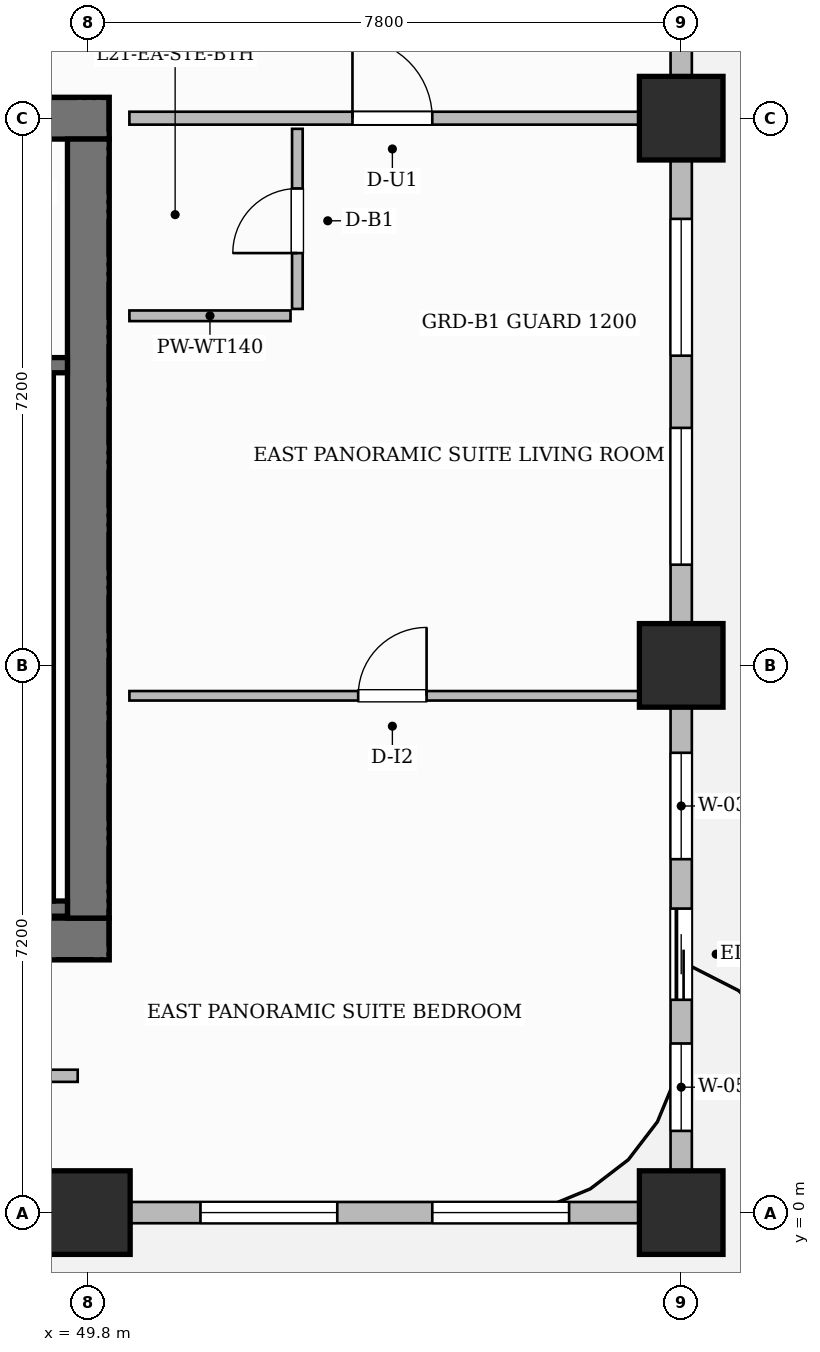
"""IFC4 building model, lengths in metres.
Left out: names, types, materials, properties, quantities, classifications, styles, units other than length and angle.
Written with IfcOpenShell. Run it as: python <this file> out.ifc"""

import sys

from ifc_helpers import new_model, si_unit, direction, frame, frame_2d, origin, origin_2d, place, context, subcontext, project, spatial, rectangle, extrude, source, transform, mapped, element, fill, save


model = new_model("IFC4")
c1 = context("Model", 3, precision=1e-05, world=origin(), true_north=direction((0.0, 1.0)))
c2 = subcontext(c1, "Body", "Model", "MODEL_VIEW")
j1 = project(units=[si_unit("LENGTHUNIT", "METRE"), si_unit("PLANEANGLEUNIT", "RADIAN")], contexts=[c1])
p1 = place(None, origin())
s1 = spatial("IfcSite", under=j1, at=p1, CompositionType="ELEMENT")
p2 = place(p1, origin())
s2 = spatial("IfcBuilding", under=s1, at=p2, CompositionType="ELEMENT")
p3 = place(p2, frame((0.0, 0.0, 87.9)))
s3 = spatial("IfcBuildingStorey", under=s2, at=p3, CompositionType="ELEMENT", Elevation=87.9)
p4 = place(p3, frame((34.525, 3.6, 0.0), z_axis=(0.0, 0.0, 1.0), x_axis=(1.0, 0.0, 0.0)))
e1 = element("IfcWall", 1, at=p4, inside=s3, PredefinedType="SHEAR", context=c2, shape_type="SweptSolid", body=[
    extrude(rectangle(XDim=15.55, YDim=0.55, at=frame_2d((7.775, 0.0))), origin(), (0.0, 0.0, 1.0), 3.7),
])
p5 = place(p4, frame((4.825, 0.0, 0.0)))
e2 = element("IfcOpeningElement", 2, at=p5, cuts=e1, PredefinedType="OPENING", context=c2, shape_type="SweptSolid", body=[
    extrude(rectangle(XDim=0.9, YDim=2.1, at=frame_2d((0.45, 1.05))), frame((0.0, 0.285, 0.0), z_axis=(0.0, -1.0, 0.0), x_axis=(1.0, 0.0, 0.0)), (0.0, 0.0, 1.0), 0.57),
])
p6 = place(p4, frame((7.245, 0.0, 0.0)))
e3 = element("IfcOpeningElement", 3, at=p6, cuts=e1, PredefinedType="OPENING", context=c2, shape_type="SweptSolid", body=[
    extrude(rectangle(XDim=0.9, YDim=2.1, at=frame_2d((0.45, 1.05))), frame((0.0, 0.285, 0.0), z_axis=(0.0, -1.0, 0.0), x_axis=(1.0, 0.0, 0.0)), (0.0, 0.0, 1.0), 0.57),
])
p7 = place(p3, frame((34.525, 14.4, 0.0), z_axis=(0.0, 0.0, 1.0), x_axis=(1.0, 0.0, 0.0)))
e4 = element("IfcWall", 4, at=p7, inside=s3, PredefinedType="SHEAR", context=c2, shape_type="SweptSolid", body=[
    extrude(rectangle(XDim=15.55, YDim=0.55, at=frame_2d((7.775, 0.0))), origin(), (0.0, 0.0, 1.0), 3.7),
])
p8 = place(p7, frame((5.405, 0.0, 0.0)))
e5 = element("IfcOpeningElement", 5, at=p8, cuts=e4, PredefinedType="OPENING", context=c2, shape_type="SweptSolid", body=[
    extrude(rectangle(XDim=1.5, YDim=2.2, at=frame_2d((0.75, 1.1))), frame((0.0, 0.285, 0.0), z_axis=(0.0, -1.0, 0.0), x_axis=(1.0, 0.0, 0.0)), (0.0, 0.0, 1.0), 0.57),
])
p9 = place(p7, frame((1.62, 0.0, 0.0)))
e6 = element("IfcOpeningElement", 6, at=p9, cuts=e4, PredefinedType="OPENING", context=c2, shape_type="SweptSolid", body=[
    extrude(rectangle(XDim=1.05, YDim=2.15, at=frame_2d((0.525, 1.075))), frame((0.0, 0.285, 0.0), z_axis=(0.0, -1.0, 0.0), x_axis=(1.0, 0.0, 0.0)), (0.0, 0.0, 1.0), 0.57),
])
p10 = place(p7, frame((11.25, 0.0, 0.0)))
e7 = element("IfcOpeningElement", 7, at=p10, cuts=e4, PredefinedType="OPENING", context=c2, shape_type="SweptSolid", body=[
    extrude(rectangle(XDim=1.05, YDim=2.15, at=frame_2d((0.525, 1.075))), frame((0.0, 0.285, 0.0), z_axis=(0.0, -1.0, 0.0), x_axis=(1.0, 0.0, 0.0)), (0.0, 0.0, 1.0), 0.57),
])
p11 = place(p3, frame((49.8, 3.875, 0.0), z_axis=(0.0, 0.0, 1.0), x_axis=(0.0, 1.0, 0.0)))
e8 = element("IfcWall", 8, at=p11, inside=s3, PredefinedType="SHEAR", context=c2, shape_type="SweptSolid", body=[
    extrude(rectangle(XDim=10.25, YDim=0.55, at=frame_2d((5.125, 0.0))), origin(), (0.0, 0.0, 1.0), 3.7),
])
m1 = source(origin(), c2, "Body", "SweptSolid", [
    extrude(rectangle(XDim=1.1, YDim=1.1, at=origin_2d()), origin(), (0.0, 0.0, 1.0), 3.7),
])
for number, where, z_axis, x_axis in (
    (9, (49.8, 0.0, 0.0), (0.0, 0.0, 1.0), (1.0, 0.0, 0.0)),
    (10, (57.6, 0.0, 0.0), (0.0, 0.0, 1.0), (1.0, 0.0, 0.0)),
    (11, (57.6, 7.2, 0.0), (0.0, 0.0, 1.0), (1.0, 0.0, 0.0)),
    (12, (57.6, 14.4, 0.0), (0.0, 0.0, 1.0), (1.0, 0.0, 0.0)),
):
    element("IfcColumn", number, at=place(p3, frame(where, z_axis=z_axis, x_axis=x_axis)), inside=s3, PredefinedType="COLUMN", context=c2, shape_type="MappedRepresentation", body=[
        mapped(m1, transform((0.0, 0.0, 0.0), scale=1.0)),
    ])
p12 = place(p3, frame((43.12, 4.0, 0.0), z_axis=(0.0, 0.0, 1.0), x_axis=(1.0, 0.0, 0.0)))
e13 = element("IfcWall", 13, at=p12, inside=s3, PredefinedType="SHEAR", context=c2, shape_type="SweptSolid", body=[
    extrude(rectangle(XDim=6.405, YDim=0.2, at=frame_2d((3.202, 0.0))), origin(), (0.0, 0.0, 1.0), 3.7),
])
p13 = place(p3, frame((49.24, 4.1, 0.0), z_axis=(0.0, 0.0, 1.0), x_axis=(0.0, 1.0, 0.0)))
e14 = element("IfcWall", 14, at=p13, inside=s3, PredefinedType="SHEAR", context=c2, shape_type="SweptSolid", body=[
    extrude(rectangle(XDim=6.95, YDim=0.2, at=frame_2d((3.475, 0.0))), origin(), (0.0, 0.0, 1.0), 3.7),
])
p14 = place(p3, frame((43.12, 11.15, 0.0), z_axis=(0.0, 0.0, 1.0), x_axis=(1.0, 0.0, 0.0)))
e15 = element("IfcWall", 15, at=p14, inside=s3, PredefinedType="SHEAR", context=c2, shape_type="SweptSolid", body=[
    extrude(rectangle(XDim=6.405, YDim=0.2, at=frame_2d((3.202, 0.0))), origin(), (0.0, 0.0, 1.0), 3.7),
])
p15 = place(p14, frame((1.045, 0.0, 0.0)))
e16 = element("IfcOpeningElement", 16, at=p15, cuts=e15, PredefinedType="OPENING", context=c2, shape_type="SweptSolid", body=[
    extrude(rectangle(XDim=1.05, YDim=2.2, at=frame_2d((0.525, 1.1))), frame((0.0, 0.11, 0.0), z_axis=(0.0, -1.0, 0.0), x_axis=(1.0, 0.0, 0.0)), (0.0, 0.0, 1.0), 0.22),
])
p16 = place(p14, frame((4.125, 0.0, 0.0)))
e17 = element("IfcOpeningElement", 17, at=p16, cuts=e15, PredefinedType="OPENING", context=c2, shape_type="SweptSolid", body=[
    extrude(rectangle(XDim=1.05, YDim=2.2, at=frame_2d((0.525, 1.1))), frame((0.0, 0.11, 0.0), z_axis=(0.0, -1.0, 0.0), x_axis=(1.0, 0.0, 0.0)), (0.0, 0.0, 1.0), 0.22),
])
p17 = place(p3, frame((30.29, 1.8, 0.0), z_axis=(0.0, 0.0, 1.0), x_axis=(1.0, 0.0, 0.0)))
e18 = element("IfcWall", 18, at=p17, inside=s3, PredefinedType="PARTITIONING", context=c2, shape_type="SweptSolid", body=[
    extrude(rectangle(XDim=19.37, YDim=0.16, at=frame_2d((9.685, 0.0))), origin(), (0.0, 0.0, 1.0), 3.45),
])
p18 = place(p17, frame((9.735, 0.0, 0.0)))
e19 = element("IfcOpeningElement", 19, at=p18, cuts=e18, PredefinedType="OPENING", context=c2, shape_type="SweptSolid", body=[
    extrude(rectangle(XDim=0.95, YDim=2.15, at=frame_2d((0.475, 1.075))), frame((0.0, 0.09, 0.0), z_axis=(0.0, -1.0, 0.0), x_axis=(1.0, 0.0, 0.0)), (0.0, 0.0, 1.0), 0.18),
])
p19 = place(p3, frame((50.34, 14.4, 0.0), z_axis=(0.0, 0.0, 1.0), x_axis=(1.0, 0.0, 0.0)))
e20 = element("IfcWall", 20, at=p19, inside=s3, PredefinedType="PARTITIONING", context=c2, shape_type="SweptSolid", body=[
    extrude(rectangle(XDim=7.07, YDim=0.17, at=frame_2d((3.535, 0.0))), origin(), (0.0, 0.0, 1.0), 2.885),
])
p20 = place(p19, frame((2.935, 0.0, 0.0)))
e21 = element("IfcOpeningElement", 21, at=p20, cuts=e20, PredefinedType="OPENING", context=c2, shape_type="SweptSolid", body=[
    extrude(rectangle(XDim=1.05, YDim=2.25, at=frame_2d((0.525, 1.125))), frame((0.0, 0.095, 0.0), z_axis=(0.0, -1.0, 0.0), x_axis=(1.0, 0.0, 0.0)), (0.0, 0.0, 1.0), 0.19),
])
p21 = place(p3, frame((52.55, 11.89, 0.0), z_axis=(0.0, 0.0, 1.0), x_axis=(0.0, 1.0, 0.0)))
e22 = element("IfcWall", 22, at=p21, inside=s3, PredefinedType="PARTITIONING", context=c2, shape_type="SweptSolid", body=[
    extrude(rectangle(XDim=2.37, YDim=0.14, at=frame_2d((1.185, 0.0))), origin(), (0.0, 0.0, 1.0), 3.45),
])
p22 = place(p21, frame((0.735, 0.0, 0.0)))
e23 = element("IfcOpeningElement", 23, at=p22, cuts=e22, PredefinedType="OPENING", context=c2, shape_type="SweptSolid", body=[
    extrude(rectangle(XDim=0.85, YDim=2.1, at=frame_2d((0.425, 1.05))), frame((0.0, 0.08, 0.0), z_axis=(0.0, -1.0, 0.0), x_axis=(1.0, 0.0, 0.0)), (0.0, 0.0, 1.0), 0.16),
])
p23 = place(p3, frame((50.34, 11.8, 0.0), z_axis=(0.0, 0.0, 1.0), x_axis=(1.0, 0.0, 0.0)))
e24 = element("IfcWall", 24, at=p23, inside=s3, PredefinedType="PARTITIONING", context=c2, shape_type="SweptSolid", body=[
    extrude(rectangle(XDim=2.12, YDim=0.14, at=frame_2d((1.06, 0.0))), origin(), (0.0, 0.0, 1.0), 3.45),
])
p24 = place(p3, frame((50.34, 6.8, 0.0), z_axis=(0.0, 0.0, 1.0), x_axis=(1.0, 0.0, 0.0)))
e25 = element("IfcWall", 25, at=p24, inside=s3, PredefinedType="PARTITIONING", context=c2, shape_type="SweptSolid", body=[
    extrude(rectangle(XDim=7.07, YDim=0.125, at=frame_2d((3.535, 0.0))), origin(), (0.0, 0.0, 1.0), 3.45),
])
p25 = place(p24, frame((3.01, 0.0, 0.0)))
e26 = element("IfcOpeningElement", 26, at=p25, cuts=e25, PredefinedType="OPENING", context=c2, shape_type="SweptSolid", body=[
    extrude(rectangle(XDim=0.9, YDim=2.15, at=frame_2d((0.45, 1.075))), frame((0.0, 0.073, 0.0), z_axis=(0.0, -1.0, 0.0), x_axis=(1.0, 0.0, 0.0)), (0.0, 0.0, 1.0), 0.145),
])
p26 = place(p3, frame((14.4, 0.0, 0.0), z_axis=(0.0, 0.0, 1.0), x_axis=(1.0, 0.0, 0.0)))
e27 = element("IfcWall", 27, at=p26, inside=s3, PredefinedType="SOLIDWALL", context=c2, shape_type="SweptSolid", body=[
    extrude(rectangle(XDim=43.2, YDim=0.28, at=frame_2d((21.6, 0.0))), origin(), (0.0, 0.0, 1.0), 2.885),
])
p27 = place(p26, frame((0.85, 0.0, 0.0)))
e28 = element("IfcOpeningElement", 28, at=p27, cuts=e27, PredefinedType="OPENING", context=c2, shape_type="SweptSolid", body=[
    extrude(rectangle(XDim=1.2, YDim=2.2, at=frame_2d((0.6, 1.1))), frame((0.0, 0.15, 0.0), z_axis=(0.0, -1.0, 0.0), x_axis=(1.0, 0.0, 0.0)), (0.0, 0.0, 1.0), 0.3),
])
p28 = place(p26, frame((3.475, 0.0, 0.8)))
e29 = element("IfcOpeningElement", 29, at=p28, cuts=e27, PredefinedType="OPENING", context=c2, shape_type="SweptSolid", body=[
    extrude(rectangle(XDim=1.8, YDim=1.85, at=frame_2d((0.9, 0.925))), frame((0.0, 0.15, 0.0), z_axis=(0.0, -1.0, 0.0), x_axis=(1.0, 0.0, 0.0)), (0.0, 0.0, 1.0), 0.3),
])
p29 = place(p26, frame((8.181, 0.0, 0.8)))
e30 = element("IfcOpeningElement", 30, at=p29, cuts=e27, PredefinedType="OPENING", context=c2, shape_type="SweptSolid", body=[
    extrude(rectangle(XDim=0.95, YDim=1.75, at=frame_2d((0.475, 0.875))), frame((0.0, 0.15, 0.0), z_axis=(0.0, -1.0, 0.0), x_axis=(1.0, 0.0, 0.0)), (0.0, 0.0, 1.0), 0.3),
])
p30 = place(p26, frame((10.564, 0.0, 0.8)))
e31 = element("IfcOpeningElement", 31, at=p30, cuts=e27, PredefinedType="OPENING", context=c2, shape_type="SweptSolid", body=[
    extrude(rectangle(XDim=1.8, YDim=1.85, at=frame_2d((0.9, 0.925))), frame((0.0, 0.15, 0.0), z_axis=(0.0, -1.0, 0.0), x_axis=(1.0, 0.0, 0.0)), (0.0, 0.0, 1.0), 0.3),
])
p31 = place(p26, frame((16.804, 0.0, 0.8)))
e32 = element("IfcOpeningElement", 32, at=p31, cuts=e27, PredefinedType="OPENING", context=c2, shape_type="SweptSolid", body=[
    extrude(rectangle(XDim=1.8, YDim=1.85, at=frame_2d((0.9, 0.925))), frame((0.0, 0.15, 0.0), z_axis=(0.0, -1.0, 0.0), x_axis=(1.0, 0.0, 0.0)), (0.0, 0.0, 1.0), 0.3),
])
p32 = place(p26, frame((21.725, 0.0, 0.8)))
e33 = element("IfcOpeningElement", 33, at=p32, cuts=e27, PredefinedType="OPENING", context=c2, shape_type="SweptSolid", body=[
    extrude(rectangle(XDim=1.8, YDim=1.85, at=frame_2d((0.9, 0.925))), frame((0.0, 0.15, 0.0), z_axis=(0.0, -1.0, 0.0), x_axis=(1.0, 0.0, 0.0)), (0.0, 0.0, 1.0), 0.3),
])
p33 = place(p26, frame((24.475, 0.0, 0.8)))
e34 = element("IfcOpeningElement", 34, at=p33, cuts=e27, PredefinedType="OPENING", context=c2, shape_type="SweptSolid", body=[
    extrude(rectangle(XDim=1.8, YDim=1.85, at=frame_2d((0.9, 0.925))), frame((0.0, 0.15, 0.0), z_axis=(0.0, -1.0, 0.0), x_axis=(1.0, 0.0, 0.0)), (0.0, 0.0, 1.0), 0.3),
])
p34 = place(p26, frame((29.075, 0.0, 0.8)))
e35 = element("IfcOpeningElement", 35, at=p34, cuts=e27, PredefinedType="OPENING", context=c2, shape_type="SweptSolid", body=[
    extrude(rectangle(XDim=1.8, YDim=1.85, at=frame_2d((0.9, 0.925))), frame((0.0, 0.15, 0.0), z_axis=(0.0, -1.0, 0.0), x_axis=(1.0, 0.0, 0.0)), (0.0, 0.0, 1.0), 0.3),
])
p35 = place(p26, frame((32.125, 0.0, 0.8)))
e36 = element("IfcOpeningElement", 36, at=p35, cuts=e27, PredefinedType="OPENING", context=c2, shape_type="SweptSolid", body=[
    extrude(rectangle(XDim=1.8, YDim=1.85, at=frame_2d((0.9, 0.925))), frame((0.0, 0.15, 0.0), z_axis=(0.0, -1.0, 0.0), x_axis=(1.0, 0.0, 0.0)), (0.0, 0.0, 1.0), 0.3),
])
p36 = place(p26, frame((36.875, 0.0, 0.8)))
e37 = element("IfcOpeningElement", 37, at=p36, cuts=e27, PredefinedType="OPENING", context=c2, shape_type="SweptSolid", body=[
    extrude(rectangle(XDim=1.8, YDim=1.85, at=frame_2d((0.9, 0.925))), frame((0.0, 0.15, 0.0), z_axis=(0.0, -1.0, 0.0), x_axis=(1.0, 0.0, 0.0)), (0.0, 0.0, 1.0), 0.3),
])
p37 = place(p26, frame((39.925, 0.0, 0.8)))
e38 = element("IfcOpeningElement", 38, at=p37, cuts=e27, PredefinedType="OPENING", context=c2, shape_type="SweptSolid", body=[
    extrude(rectangle(XDim=1.8, YDim=1.85, at=frame_2d((0.9, 0.925))), frame((0.0, 0.15, 0.0), z_axis=(0.0, -1.0, 0.0), x_axis=(1.0, 0.0, 0.0)), (0.0, 0.0, 1.0), 0.3),
])
p38 = place(p3, frame((57.6, 0.05, 0.0), z_axis=(0.0, 0.0, 1.0), x_axis=(0.0, 1.0, 0.0)))
e39 = element("IfcWall", 39, at=p38, inside=s3, PredefinedType="SOLIDWALL", context=c2, shape_type="SweptSolid", body=[
    extrude(rectangle(XDim=21.5, YDim=0.28, at=frame_2d((10.75, 0.0))), origin(), (0.0, 0.0, 1.0), 2.885),
])
p39 = place(p38, frame((2.75, 0.0, 0.0)))
e40 = element("IfcOpeningElement", 40, at=p39, cuts=e39, PredefinedType="OPENING", context=c2, shape_type="SweptSolid", body=[
    extrude(rectangle(XDim=1.2, YDim=2.2, at=frame_2d((0.6, 1.1))), frame((0.0, 0.15, 0.0), z_axis=(0.0, -1.0, 0.0), x_axis=(1.0, 0.0, 0.0)), (0.0, 0.0, 1.0), 0.3),
])
p40 = place(p38, frame((1.025, 0.0, 0.8)))
e41 = element("IfcOpeningElement", 41, at=p40, cuts=e39, PredefinedType="OPENING", context=c2, shape_type="SweptSolid", body=[
    extrude(rectangle(XDim=1.15, YDim=1.8, at=frame_2d((0.575, 0.9))), frame((0.0, 0.15, 0.0), z_axis=(0.0, -1.0, 0.0), x_axis=(1.0, 0.0, 0.0)), (0.0, 0.0, 1.0), 0.3),
])
p41 = place(p38, frame((4.6, 0.0, 0.8)))
e42 = element("IfcOpeningElement", 42, at=p41, cuts=e39, PredefinedType="OPENING", context=c2, shape_type="SweptSolid", body=[
    extrude(rectangle(XDim=1.4, YDim=1.85, at=frame_2d((0.7, 0.925))), frame((0.0, 0.15, 0.0), z_axis=(0.0, -1.0, 0.0), x_axis=(1.0, 0.0, 0.0)), (0.0, 0.0, 1.0), 0.3),
])
p42 = place(p38, frame((8.475, 0.0, 0.8)))
e43 = element("IfcOpeningElement", 43, at=p42, cuts=e39, PredefinedType="OPENING", context=c2, shape_type="SweptSolid", body=[
    extrude(rectangle(XDim=1.8, YDim=1.85, at=frame_2d((0.9, 0.925))), frame((0.0, 0.15, 0.0), z_axis=(0.0, -1.0, 0.0), x_axis=(1.0, 0.0, 0.0)), (0.0, 0.0, 1.0), 0.3),
])
p43 = place(p38, frame((11.225, 0.0, 0.8)))
e44 = element("IfcOpeningElement", 44, at=p43, cuts=e39, PredefinedType="OPENING", context=c2, shape_type="SweptSolid", body=[
    extrude(rectangle(XDim=1.8, YDim=1.85, at=frame_2d((0.9, 0.925))), frame((0.0, 0.15, 0.0), z_axis=(0.0, -1.0, 0.0), x_axis=(1.0, 0.0, 0.0)), (0.0, 0.0, 1.0), 0.3),
])
p44 = place(p38, frame((17.679, 0.0, 0.8)))
e45 = element("IfcOpeningElement", 45, at=p44, cuts=e39, PredefinedType="OPENING", context=c2, shape_type="SweptSolid", body=[
    extrude(rectangle(XDim=1.8, YDim=1.85, at=frame_2d((0.9, 0.925))), frame((0.0, 0.15, 0.0), z_axis=(0.0, -1.0, 0.0), x_axis=(1.0, 0.0, 0.0)), (0.0, 0.0, 1.0), 0.3),
])
m2 = source(origin(), c2, "Body", "SweptSolid", [
    extrude(rectangle(XDim=1.05, YDim=2.25, at=frame_2d((0.525, 1.125))), frame((0.0, 0.025, 0.0), z_axis=(0.0, -1.0, 0.0), x_axis=(1.0, 0.0, 0.0)), (0.0, 0.0, 1.0), 0.05),
])
p45 = place(p20, origin())
e46 = element("IfcDoor", 46, at=p45, inside=s3, OperationType="SINGLE_SWING_LEFT", PredefinedType="DOOR", context=c2, shape_type="MappedRepresentation", body=[
    mapped(m2, transform((0.0, 0.0, 0.0), scale=1.0)),
])
fill(e21, e46)
m3 = source(origin(), c2, "Body", "SweptSolid", [
    extrude(rectangle(XDim=0.85, YDim=2.1, at=frame_2d((0.425, 1.05))), frame((0.0, 0.025, 0.0), z_axis=(0.0, -1.0, 0.0), x_axis=(1.0, 0.0, 0.0)), (0.0, 0.0, 1.0), 0.05),
])
p46 = place(p22, origin())
e47 = element("IfcDoor", 47, at=p46, inside=s3, OperationType="SINGLE_SWING_LEFT", PredefinedType="DOOR", context=c2, shape_type="MappedRepresentation", body=[
    mapped(m3, transform((0.0, 0.0, 0.0), scale=1.0)),
])
fill(e23, e47)
m4 = source(origin(), c2, "Body", "SweptSolid", [
    extrude(rectangle(XDim=0.9, YDim=2.15, at=frame_2d((0.45, 1.075))), frame((0.0, 0.025, 0.0), z_axis=(0.0, -1.0, 0.0), x_axis=(1.0, 0.0, 0.0)), (0.0, 0.0, 1.0), 0.05),
])
p47 = place(p25, origin())
e48 = element("IfcDoor", 48, at=p47, inside=s3, OperationType="SINGLE_SWING_RIGHT", PredefinedType="DOOR", context=c2, shape_type="MappedRepresentation", body=[
    mapped(m4, transform((0.0, 0.0, 0.0), scale=1.0)),
])
fill(e26, e48)
m5 = source(origin(), c2, "Body", "SweptSolid", [
    extrude(rectangle(XDim=1.2, YDim=2.2, at=frame_2d((0.6, 1.1))), frame((0.0, 0.025, 0.0), z_axis=(0.0, -1.0, 0.0), x_axis=(1.0, 0.0, 0.0)), (0.0, 0.0, 1.0), 0.05),
])
p48 = place(p39, origin())
e49 = element("IfcDoor", 49, at=p48, inside=s3, OperationType="SLIDING_TO_LEFT", PredefinedType="DOOR", context=c2, shape_type="MappedRepresentation", body=[
    mapped(m5, transform((0.0, 0.0, 0.0), scale=1.0)),
])
fill(e40, e49)
m6 = source(origin(), c2, "Body", "SweptSolid", [
    extrude(rectangle(XDim=1.8, YDim=1.85, at=frame_2d((0.9, 0.925))), frame((0.0, 0.03, 0.0), z_axis=(0.0, -1.0, 0.0), x_axis=(1.0, 0.0, 0.0)), (0.0, 0.0, 1.0), 0.06),
])
p49 = place(p36, origin())
e50 = element("IfcWindow", 50, at=p49, inside=s3, PartitioningType="DOUBLE_PANEL_VERTICAL", PredefinedType="WINDOW", context=c2, shape_type="MappedRepresentation", body=[
    mapped(m6, transform((0.0, 0.0, 0.0), scale=1.0)),
])
fill(e37, e50)
p50 = place(p37, origin())
e51 = element("IfcWindow", 51, at=p50, inside=s3, PartitioningType="DOUBLE_PANEL_VERTICAL", PredefinedType="WINDOW", context=c2, shape_type="MappedRepresentation", body=[
    mapped(m6, transform((0.0, 0.0, 0.0), scale=1.0)),
])
fill(e38, e51)
m7 = source(origin(), c2, "Body", "SweptSolid", [
    extrude(rectangle(XDim=1.15, YDim=1.8, at=frame_2d((0.575, 0.9))), frame((0.0, 0.03, 0.0), z_axis=(0.0, -1.0, 0.0), x_axis=(1.0, 0.0, 0.0)), (0.0, 0.0, 1.0), 0.06),
])
p51 = place(p40, origin())
e52 = element("IfcWindow", 52, at=p51, inside=s3, PartitioningType="SINGLE_PANEL", PredefinedType="WINDOW", context=c2, shape_type="MappedRepresentation", body=[
    mapped(m7, transform((0.0, 0.0, 0.0), scale=1.0)),
])
fill(e41, e52)
m8 = source(origin(), c2, "Body", "SweptSolid", [
    extrude(rectangle(XDim=1.4, YDim=1.85, at=frame_2d((0.7, 0.925))), frame((0.0, 0.03, 0.0), z_axis=(0.0, -1.0, 0.0), x_axis=(1.0, 0.0, 0.0)), (0.0, 0.0, 1.0), 0.06),
])
p52 = place(p41, origin())
e53 = element("IfcWindow", 53, at=p52, inside=s3, PartitioningType="SINGLE_PANEL", PredefinedType="WINDOW", context=c2, shape_type="MappedRepresentation", body=[
    mapped(m8, transform((0.0, 0.0, 0.0), scale=1.0)),
])
fill(e42, e53)
p53 = place(p42, origin())
e54 = element("IfcWindow", 54, at=p53, inside=s3, PartitioningType="DOUBLE_PANEL_VERTICAL", PredefinedType="WINDOW", context=c2, shape_type="MappedRepresentation", body=[
    mapped(m6, transform((0.0, 0.0, 0.0), scale=1.0)),
])
fill(e43, e54)
p54 = place(p43, origin())
e55 = element("IfcWindow", 55, at=p54, inside=s3, PartitioningType="DOUBLE_PANEL_VERTICAL", PredefinedType="WINDOW", context=c2, shape_type="MappedRepresentation", body=[
    mapped(m6, transform((0.0, 0.0, 0.0), scale=1.0)),
])
fill(e44, e55)
save(model, sys.argv[1])
